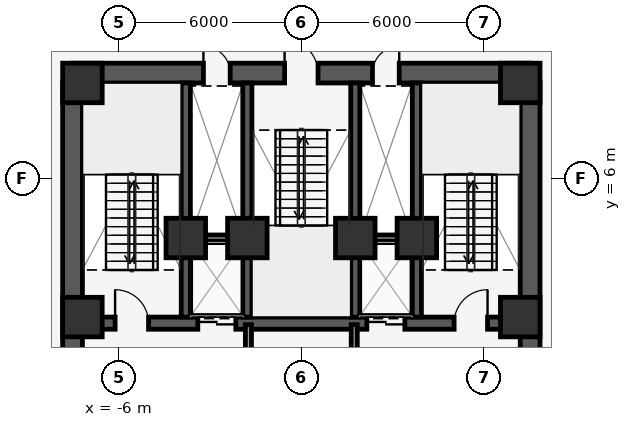
"""IFC4 building model, lengths in metres.
Left out: names, types, materials, properties, quantities, classifications, styles, units other than length and angle.
Written with IfcOpenShell. Run it as: python <this file> out.ifc"""

import sys

from ifc_helpers import new_model, si_unit, direction, frame, frame_2d, origin, origin_2d, place, context, subcontext, project, spatial, rectangle, extrude, element, fill, save


model = new_model("IFC4")
c1 = context("Model", 3, precision=1e-05, world=origin(), true_north=direction((0.0, 1.0)))
c2 = subcontext(c1, "Body", "Model", "MODEL_VIEW")
j1 = project(units=[si_unit("LENGTHUNIT", "METRE"), si_unit("PLANEANGLEUNIT", "RADIAN")], contexts=[c1])
p1 = place(None, origin())
s1 = spatial("IfcSite", under=j1, at=p1, CompositionType="ELEMENT")
p2 = place(p1, origin())
s2 = spatial("IfcBuilding", under=s1, at=p2, CompositionType="ELEMENT")
p3 = place(p2, frame((0.0, 0.0, 152.7)))
s3 = spatial("IfcBuildingStorey", under=s2, at=p3, CompositionType="ELEMENT", Elevation=152.7)
p4 = place(p3, frame((-7.525, 9.475, 0.0), z_axis=(0.0, 0.0, 1.0), x_axis=(1.0, 0.0, 0.0)))
e1 = element("IfcWall", 1, at=p4, inside=s3, PredefinedType="SHEAR", context=c2, shape_type="SweptSolid", body=[
    extrude(rectangle(XDim=15.05, YDim=0.65, at=frame_2d((7.525, 0.0))), origin(), (0.0, 0.0, 1.0), 3.85),
])
p5 = place(p4, frame((6.975, 0.0, 0.0)))
e2 = element("IfcOpeningElement", 2, at=p5, cuts=e1, PredefinedType="OPENING", context=c2, shape_type="SweptSolid", body=[
    extrude(rectangle(XDim=1.1, YDim=2.15, at=frame_2d((0.55, 1.075))), frame((0.0, 0.335, 0.0), z_axis=(0.0, -1.0, 0.0), x_axis=(1.0, 0.0, 0.0)), (0.0, 0.0, 1.0), 0.67),
])
p6 = place(p4, frame((4.305, 0.0, 0.0)))
e3 = element("IfcOpeningElement", 3, at=p6, cuts=e1, PredefinedType="OPENING", context=c2, shape_type="SweptSolid", body=[
    extrude(rectangle(XDim=0.88, YDim=2.15, at=frame_2d((0.44, 1.075))), frame((0.0, 0.335, 0.0), z_axis=(0.0, -1.0, 0.0), x_axis=(1.0, 0.0, 0.0)), (0.0, 0.0, 1.0), 0.67),
])
p7 = place(p4, frame((9.865, 0.0, 0.0)))
e4 = element("IfcOpeningElement", 4, at=p7, cuts=e1, PredefinedType="OPENING", context=c2, shape_type="SweptSolid", body=[
    extrude(rectangle(XDim=0.88, YDim=2.15, at=frame_2d((0.44, 1.075))), frame((0.0, 0.335, 0.0), z_axis=(0.0, -1.0, 0.0), x_axis=(1.0, 0.0, 0.0)), (0.0, 0.0, 1.0), 0.67),
])
p8 = place(p3, frame((-7.2, 1.25, 0.0), z_axis=(0.0, 0.0, 1.0), x_axis=(1.0, 0.0, 0.0)))
e5 = element("IfcWall", 5, at=p8, inside=s3, PredefinedType="SHEAR", context=c2, shape_type="SweptSolid", body=[
    extrude(rectangle(XDim=14.4, YDim=0.4, at=frame_2d((7.2, 0.0))), origin(), (0.0, 0.0, 1.0), 3.85),
])
p9 = place(p8, frame((3.795, 0.0, 0.0)))
e6 = element("IfcOpeningElement", 6, at=p9, cuts=e5, PredefinedType="OPENING", context=c2, shape_type="SweptSolid", body=[
    extrude(rectangle(XDim=1.25, YDim=2.25, at=frame_2d((0.625, 1.125))), frame((0.0, 0.21, 0.0), z_axis=(0.0, -1.0, 0.0), x_axis=(1.0, 0.0, 0.0)), (0.0, 0.0, 1.0), 0.42),
])
p10 = place(p8, frame((9.355, 0.0, 0.0)))
e7 = element("IfcOpeningElement", 7, at=p10, cuts=e5, PredefinedType="OPENING", context=c2, shape_type="SweptSolid", body=[
    extrude(rectangle(XDim=1.25, YDim=2.25, at=frame_2d((0.625, 1.125))), frame((0.0, 0.21, 0.0), z_axis=(0.0, -1.0, 0.0), x_axis=(1.0, 0.0, 0.0)), (0.0, 0.0, 1.0), 0.42),
])
p11 = place(p8, frame((1.075, 0.0, 0.0)))
e8 = element("IfcOpeningElement", 8, at=p11, cuts=e5, PredefinedType="OPENING", context=c2, shape_type="SweptSolid", body=[
    extrude(rectangle(XDim=1.1, YDim=2.15, at=frame_2d((0.55, 1.075))), frame((0.0, 0.21, 0.0), z_axis=(0.0, -1.0, 0.0), x_axis=(1.0, 0.0, 0.0)), (0.0, 0.0, 1.0), 0.42),
])
p12 = place(p8, frame((12.225, 0.0, 0.0)))
e9 = element("IfcOpeningElement", 9, at=p12, cuts=e5, PredefinedType="OPENING", context=c2, shape_type="SweptSolid", body=[
    extrude(rectangle(XDim=1.1, YDim=2.15, at=frame_2d((0.55, 1.075))), frame((0.0, 0.21, 0.0), z_axis=(0.0, -1.0, 0.0), x_axis=(1.0, 0.0, 0.0)), (0.0, 0.0, 1.0), 0.42),
])
for number, where, z_axis, x_axis in (
    (10, (-3.8, 1.45, 0.0), (0.0, 0.0, 1.0), (0.0, 1.0, 0.0)),
    (11, (-1.775, 1.45, 0.0), (0.0, 0.0, 1.0), (0.0, 1.0, 0.0)),
    (12, (1.775, 1.45, 0.0), (0.0, 0.0, 1.0), (0.0, 1.0, 0.0)),
    (13, (3.8, 1.45, 0.0), (0.0, 0.0, 1.0), (0.0, 1.0, 0.0)),
):
    element("IfcWall", number, at=place(p3, frame(where, z_axis=z_axis, x_axis=x_axis)), inside=s3, PredefinedType="SHEAR", context=c2, shape_type="SweptSolid", body=[
        extrude(rectangle(XDim=7.7, YDim=0.3, at=frame_2d((3.85, 0.0))), origin(), (0.0, 0.0, 1.0), 3.85),
    ])
for number, where, z_axis, x_axis in (
    (14, (-7.525, 0.1, 0.0), (0.0, 0.0, 1.0), (0.0, 1.0, 0.0)),
    (15, (7.525, 0.1, 0.0), (0.0, 0.0, 1.0), (0.0, 1.0, 0.0)),
):
    element("IfcWall", number, at=place(p3, frame(where, z_axis=z_axis, x_axis=x_axis)), inside=s3, PredefinedType="SHEAR", context=c2, shape_type="SweptSolid", body=[
        extrude(rectangle(XDim=9.05, YDim=0.65, at=frame_2d((4.525, 0.0))), origin(), (0.0, 0.0, 1.0), 3.85),
    ])
for number, where, z_axis, x_axis in (
    (16, (7.2, 1.45, 0.0), (0.0, 0.0, 1.0), (1.0, 0.0, 0.0)),
    (17, (7.2, 9.15, 0.0), (0.0, 0.0, 1.0), (1.0, 0.0, 0.0)),
    (18, (-7.2, 9.15, 0.0), (0.0, 0.0, 1.0), (1.0, 0.0, 0.0)),
    (19, (-7.2, 1.45, 0.0), (0.0, 0.0, 1.0), (1.0, 0.0, 0.0)),
    (20, (-3.8, 4.05, 0.0), (0.0, 0.0, 1.0), (1.0, 0.0, 0.0)),
    (21, (3.8, 4.05, 0.0), (0.0, 0.0, 1.0), (1.0, 0.0, 0.0)),
    (22, (-1.775, 4.05, 0.0), (0.0, 0.0, 1.0), (1.0, 0.0, 0.0)),
    (23, (1.775, 4.05, 0.0), (0.0, 0.0, 1.0), (1.0, 0.0, 0.0)),
):
    element("IfcColumn", number, at=place(p3, frame(where, z_axis=z_axis, x_axis=x_axis)), inside=s3, PredefinedType="COLUMN", context=c2, shape_type="SweptSolid", body=[
        extrude(rectangle(XDim=1.3, YDim=1.3, at=origin_2d()), origin(), (0.0, 0.0, 1.0), 4.1),
    ])
p13 = place(p3, frame((-8.762, 34.748, 0.0), z_axis=(0.0, 0.0, 1.0), x_axis=(0.780669916438, -0.624943582708, 0.0)))
e24 = element("IfcWall", 24, at=p13, inside=s3, PredefinedType="STANDARD", context=c2, shape_type="SweptSolid", body=[
    extrude(rectangle(XDim=58.093, YDim=0.3, at=frame_2d((29.046, 0.0))), origin(), (0.0, 0.0, 1.0), 3.85),
])
p14 = place(p13, frame((28.547, 0.0, 0.0)))
e25 = element("IfcOpeningElement", 25, at=p14, cuts=e24, PredefinedType="OPENING", context=c2, shape_type="SweptSolid", body=[
    extrude(rectangle(XDim=1.0, YDim=2.15, at=frame_2d((0.5, 1.075))), frame((0.0, 0.16, 0.0), z_axis=(0.0, -1.0, 0.0), x_axis=(1.0, 0.0, 0.0)), (0.0, 0.0, 1.0), 0.32),
])
p15 = place(p13, frame((5.947, 0.0, 0.85)))
e26 = element("IfcOpeningElement", 26, at=p15, cuts=e24, PredefinedType="OPENING", context=c2, shape_type="SweptSolid", body=[
    extrude(rectangle(XDim=1.4, YDim=2.2, at=frame_2d((0.7, 1.1))), frame((0.0, 0.16, 0.0), z_axis=(0.0, -1.0, 0.0), x_axis=(1.0, 0.0, 0.0)), (0.0, 0.0, 1.0), 0.32),
])
p16 = place(p13, frame((11.547, 0.0, 0.85)))
e27 = element("IfcOpeningElement", 27, at=p16, cuts=e24, PredefinedType="OPENING", context=c2, shape_type="SweptSolid", body=[
    extrude(rectangle(XDim=1.4, YDim=2.2, at=frame_2d((0.7, 1.1))), frame((0.0, 0.16, 0.0), z_axis=(0.0, -1.0, 0.0), x_axis=(1.0, 0.0, 0.0)), (0.0, 0.0, 1.0), 0.32),
])
p17 = place(p13, frame((17.146, 0.0, 0.85)))
e28 = element("IfcOpeningElement", 28, at=p17, cuts=e24, PredefinedType="OPENING", context=c2, shape_type="SweptSolid", body=[
    extrude(rectangle(XDim=1.4, YDim=2.2, at=frame_2d((0.7, 1.1))), frame((0.0, 0.16, 0.0), z_axis=(0.0, -1.0, 0.0), x_axis=(1.0, 0.0, 0.0)), (0.0, 0.0, 1.0), 0.32),
])
p18 = place(p13, frame((22.747, 0.0, 0.85)))
e29 = element("IfcOpeningElement", 29, at=p18, cuts=e24, PredefinedType="OPENING", context=c2, shape_type="SweptSolid", body=[
    extrude(rectangle(XDim=1.4, YDim=2.2, at=frame_2d((0.7, 1.1))), frame((0.0, 0.16, 0.0), z_axis=(0.0, -1.0, 0.0), x_axis=(1.0, 0.0, 0.0)), (0.0, 0.0, 1.0), 0.32),
])
p19 = place(p13, frame((33.947, 0.0, 0.85)))
e30 = element("IfcOpeningElement", 30, at=p19, cuts=e24, PredefinedType="OPENING", context=c2, shape_type="SweptSolid", body=[
    extrude(rectangle(XDim=1.4, YDim=2.2, at=frame_2d((0.7, 1.1))), frame((0.0, 0.16, 0.0), z_axis=(0.0, -1.0, 0.0), x_axis=(1.0, 0.0, 0.0)), (0.0, 0.0, 1.0), 0.32),
])
p20 = place(p13, frame((39.547, 0.0, 0.85)))
e31 = element("IfcOpeningElement", 31, at=p20, cuts=e24, PredefinedType="OPENING", context=c2, shape_type="SweptSolid", body=[
    extrude(rectangle(XDim=1.4, YDim=2.2, at=frame_2d((0.7, 1.1))), frame((0.0, 0.16, 0.0), z_axis=(0.0, -1.0, 0.0), x_axis=(1.0, 0.0, 0.0)), (0.0, 0.0, 1.0), 0.32),
])
p21 = place(p13, frame((45.146, 0.0, 0.85)))
e32 = element("IfcOpeningElement", 32, at=p21, cuts=e24, PredefinedType="OPENING", context=c2, shape_type="SweptSolid", body=[
    extrude(rectangle(XDim=1.4, YDim=2.2, at=frame_2d((0.7, 1.1))), frame((0.0, 0.16, 0.0), z_axis=(0.0, -1.0, 0.0), x_axis=(1.0, 0.0, 0.0)), (0.0, 0.0, 1.0), 0.32),
])
p22 = place(p13, frame((50.747, 0.0, 0.85)))
e33 = element("IfcOpeningElement", 33, at=p22, cuts=e24, PredefinedType="OPENING", context=c2, shape_type="SweptSolid", body=[
    extrude(rectangle(XDim=1.4, YDim=2.2, at=frame_2d((0.7, 1.1))), frame((0.0, 0.16, 0.0), z_axis=(0.0, -1.0, 0.0), x_axis=(1.0, 0.0, 0.0)), (0.0, 0.0, 1.0), 0.32),
])
for number, where, z_axis, x_axis in (
    (34, (-3.65, 4.05, 0.0), (0.0, 0.0, 1.0), (1.0, 0.0, 0.0)),
    (35, (1.92, 4.05, 0.0), (0.0, 0.0, 1.0), (1.0, 0.0, 0.0)),
):
    element("IfcWall", number, at=place(p3, frame(where, z_axis=z_axis, x_axis=x_axis)), inside=s3, PredefinedType="PARTITIONING", context=c2, shape_type="SweptSolid", body=[
        extrude(rectangle(XDim=1.73, YDim=0.2, at=frame_2d((0.865, 0.0))), origin(), (0.0, 0.0, 1.0), 3.85),
    ])
p23 = place(p3, frame((-1.74, -1.78, 0.0), z_axis=(0.0, 0.0, 1.0), x_axis=(0.0, 1.0, 0.0)))
e36 = element("IfcWall", 36, at=p23, inside=s3, PredefinedType="PARTITIONING", context=c2, shape_type="SweptSolid", body=[
    extrude(rectangle(XDim=2.98, YDim=0.2, at=frame_2d((1.49, 0.0))), origin(), (0.0, 0.0, 1.0), 3.85),
])
p24 = place(p23, frame((0.89, 0.0, 0.0)))
e37 = element("IfcOpeningElement", 37, at=p24, cuts=e36, PredefinedType="OPENING", context=c2, shape_type="SweptSolid", body=[
    extrude(rectangle(XDim=0.88, YDim=2.15, at=frame_2d((0.44, 1.075))), frame((0.0, 0.11, 0.0), z_axis=(0.0, -1.0, 0.0), x_axis=(1.0, 0.0, 0.0)), (0.0, 0.0, 1.0), 0.22),
])
p25 = place(p3, frame((1.74, -1.78, 0.0), z_axis=(0.0, 0.0, 1.0), x_axis=(0.0, 1.0, 0.0)))
e38 = element("IfcWall", 38, at=p25, inside=s3, PredefinedType="PARTITIONING", context=c2, shape_type="SweptSolid", body=[
    extrude(rectangle(XDim=2.98, YDim=0.2, at=frame_2d((1.49, 0.0))), origin(), (0.0, 0.0, 1.0), 3.85),
])
p26 = place(p9, origin())
e39 = element("IfcDoor", 39, at=p26, inside=s3, OperationType="DOUBLE_DOOR_SLIDING", PredefinedType="DOOR", context=c2, shape_type="SweptSolid", body=[
    extrude(rectangle(XDim=1.25, YDim=2.25, at=frame_2d((0.625, 1.125))), frame((0.0, 0.025, 0.0), z_axis=(0.0, -1.0, 0.0), x_axis=(1.0, 0.0, 0.0)), (0.0, 0.0, 1.0), 0.05),
])
fill(e6, e39)
p27 = place(p10, origin())
e40 = element("IfcDoor", 40, at=p27, inside=s3, OperationType="DOUBLE_DOOR_SLIDING", PredefinedType="DOOR", context=c2, shape_type="SweptSolid", body=[
    extrude(rectangle(XDim=1.25, YDim=2.25, at=frame_2d((0.625, 1.125))), frame((0.0, 0.025, 0.0), z_axis=(0.0, -1.0, 0.0), x_axis=(1.0, 0.0, 0.0)), (0.0, 0.0, 1.0), 0.05),
])
fill(e7, e40)
p28 = place(p11, origin())
e41 = element("IfcDoor", 41, at=p28, inside=s3, OperationType="SINGLE_SWING_LEFT", PredefinedType="DOOR", context=c2, shape_type="SweptSolid", body=[
    extrude(rectangle(XDim=1.1, YDim=2.15, at=frame_2d((0.55, 1.075))), frame((0.0, 0.025, 0.0), z_axis=(0.0, -1.0, 0.0), x_axis=(1.0, 0.0, 0.0)), (0.0, 0.0, 1.0), 0.05),
])
fill(e8, e41)
p29 = place(p12, origin())
e42 = element("IfcDoor", 42, at=p29, inside=s3, OperationType="SINGLE_SWING_RIGHT", PredefinedType="DOOR", context=c2, shape_type="SweptSolid", body=[
    extrude(rectangle(XDim=1.1, YDim=2.15, at=frame_2d((0.55, 1.075))), frame((0.0, 0.025, 0.0), z_axis=(0.0, -1.0, 0.0), x_axis=(1.0, 0.0, 0.0)), (0.0, 0.0, 1.0), 0.05),
])
fill(e9, e42)
p30 = place(p5, origin())
e43 = element("IfcDoor", 43, at=p30, inside=s3, OperationType="SINGLE_SWING_LEFT", PredefinedType="DOOR", context=c2, shape_type="SweptSolid", body=[
    extrude(rectangle(XDim=1.1, YDim=2.15, at=frame_2d((0.55, 1.075))), frame((0.0, 0.025, 0.0), z_axis=(0.0, -1.0, 0.0), x_axis=(1.0, 0.0, 0.0)), (0.0, 0.0, 1.0), 0.05),
])
fill(e2, e43)
p31 = place(p6, origin())
e44 = element("IfcDoor", 44, at=p31, inside=s3, OperationType="SINGLE_SWING_LEFT", PredefinedType="DOOR", context=c2, shape_type="SweptSolid", body=[
    extrude(rectangle(XDim=0.88, YDim=2.15, at=frame_2d((0.44, 1.075))), frame((0.0, 0.025, 0.0), z_axis=(0.0, -1.0, 0.0), x_axis=(1.0, 0.0, 0.0)), (0.0, 0.0, 1.0), 0.05),
])
fill(e3, e44)
p32 = place(p7, origin())
e45 = element("IfcDoor", 45, at=p32, inside=s3, OperationType="SINGLE_SWING_RIGHT", PredefinedType="DOOR", context=c2, shape_type="SweptSolid", body=[
    extrude(rectangle(XDim=0.88, YDim=2.15, at=frame_2d((0.44, 1.075))), frame((0.0, 0.025, 0.0), z_axis=(0.0, -1.0, 0.0), x_axis=(1.0, 0.0, 0.0)), (0.0, 0.0, 1.0), 0.05),
])
fill(e4, e45)
save(model, sys.argv[1])
